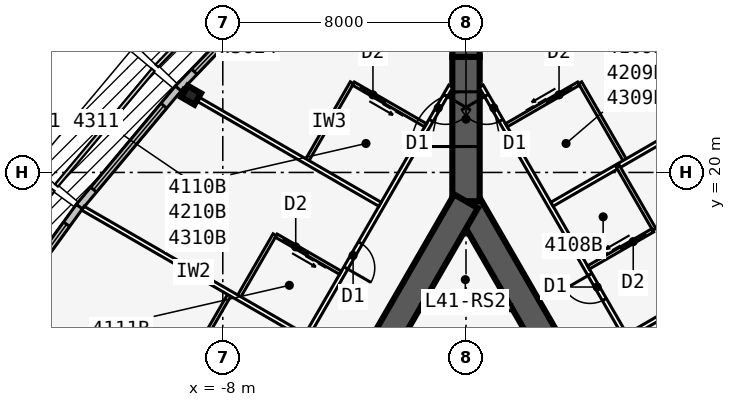
"""IFC4 building model, lengths in metres.
Left out: names, types, materials, properties, quantities, classifications, styles, units other than length and angle.
Written with IfcOpenShell. Run it as: python <this file> out.ifc"""

import sys

from ifc_helpers import new_model, si_unit, direction, frame, frame_2d, origin, origin_2d, place, context, subcontext, project, spatial, rectangle, i_section, extrude, element, fill, save


model = new_model("IFC4")
c1 = context("Model", 3, precision=1e-05, world=origin(), true_north=direction((0.0, 1.0)))
c2 = subcontext(c1, "Body", "Model", "MODEL_VIEW")
j1 = project(units=[si_unit("LENGTHUNIT", "METRE"), si_unit("PLANEANGLEUNIT", "RADIAN")], contexts=[c1])
p1 = place(None, origin())
s1 = spatial("IfcSite", under=j1, at=p1, CompositionType="ELEMENT")
p2 = place(p1, origin())
s2 = spatial("IfcBuilding", under=s1, at=p2, CompositionType="ELEMENT")
p3 = place(p2, frame((0.0, 0.0, 155.5)))
s3 = spatial("IfcBuildingStorey", under=s2, at=p3, CompositionType="ELEMENT", Elevation=155.5)
p4 = place(p3, frame((16.5, -9.526, 0.0), z_axis=(0.0, 0.0, 1.0), x_axis=(-0.499999749417, 0.866025548458, 0.0)))
e1 = element("IfcWall", 1, at=p4, inside=s3, PredefinedType="SHEAR", context=c2, shape_type="SweptSolid", body=[
    extrude(rectangle(XDim=33.0, YDim=0.9, at=frame_2d((16.5, 0.0))), origin(), (0.0, 0.0, 1.0), 3.4),
])
p5 = place(p4, frame((14.15, 0.0, 0.0)))
e2 = element("IfcOpeningElement", 2, at=p5, cuts=e1, PredefinedType="OPENING", context=c2, shape_type="SweptSolid", body=[
    extrude(rectangle(XDim=1.8, YDim=2.13, at=frame_2d((0.9, 1.065))), frame((0.0, 0.46, 0.0), z_axis=(0.0, -1.0, 0.0), x_axis=(1.0, 0.0, 0.0)), (0.0, 0.0, 1.0), 0.92),
])
p6 = place(p4, frame((12.6, 0.0, 0.0)))
e3 = element("IfcOpeningElement", 3, at=p6, cuts=e1, PredefinedType="OPENING", context=c2, shape_type="SweptSolid", body=[
    extrude(rectangle(XDim=1.0, YDim=2.13, at=frame_2d((0.5, 1.065))), frame((0.0, 0.46, 0.0), z_axis=(0.0, -1.0, 0.0), x_axis=(1.0, 0.0, 0.0)), (0.0, 0.0, 1.0), 0.92),
])
p7 = place(p3, frame((0.0, 19.052, 0.0), z_axis=(0.0, 0.0, 1.0), x_axis=(-0.499999749417, -0.866025548458, 0.0)))
e4 = element("IfcWall", 4, at=p7, inside=s3, PredefinedType="SHEAR", context=c2, shape_type="SweptSolid", body=[
    extrude(rectangle(XDim=33.0, YDim=0.9, at=frame_2d((16.5, 0.0))), origin(), (0.0, 0.0, 1.0), 3.4),
])
p8 = place(p7, frame((14.15, 0.0, 0.0)))
e5 = element("IfcOpeningElement", 5, at=p8, cuts=e4, PredefinedType="OPENING", context=c2, shape_type="SweptSolid", body=[
    extrude(rectangle(XDim=1.8, YDim=2.13, at=frame_2d((0.9, 1.065))), frame((0.0, 0.46, 0.0), z_axis=(0.0, -1.0, 0.0), x_axis=(1.0, 0.0, 0.0)), (0.0, 0.0, 1.0), 0.92),
])
p9 = place(p7, frame((12.6, 0.0, 0.0)))
e6 = element("IfcOpeningElement", 6, at=p9, cuts=e4, PredefinedType="OPENING", context=c2, shape_type="SweptSolid", body=[
    extrude(rectangle(XDim=1.0, YDim=2.13, at=frame_2d((0.5, 1.065))), frame((0.0, 0.46, 0.0), z_axis=(0.0, -1.0, 0.0), x_axis=(1.0, 0.0, 0.0)), (0.0, 0.0, 1.0), 0.92),
])
p10 = place(p3, frame((0.0, 19.052, 0.0), z_axis=(0.0, 0.0, 1.0), x_axis=(0.0, 1.0, 0.0)))
e7 = element("IfcWall", 7, at=p10, inside=s3, PredefinedType="SHEAR", context=c2, shape_type="SweptSolid", body=[
    extrude(rectangle(XDim=4.746, YDim=0.9, at=frame_2d((2.373, 0.0))), origin(), (0.0, 0.0, 1.0), 3.4),
])
p11 = place(p10, frame((1.8, 0.0, 0.0)))
e8 = element("IfcOpeningElement", 8, at=p11, cuts=e7, PredefinedType="OPENING", context=c2, shape_type="SweptSolid", body=[
    extrude(rectangle(XDim=1.8, YDim=2.13, at=frame_2d((0.9, 1.065))), frame((0.0, 0.46, 0.0), z_axis=(0.0, -1.0, 0.0), x_axis=(1.0, 0.0, 0.0)), (0.0, 0.0, 1.0), 0.92),
])
p12 = place(p3, frame((0.0, 23.799, 0.0), z_axis=(0.0, 0.0, 1.0), x_axis=(0.0, 1.0, 0.0)))
e9 = element("IfcWall", 9, at=p12, inside=s3, PredefinedType="SHEAR", context=c2, shape_type="SweptSolid", body=[
    extrude(rectangle(XDim=1.155, YDim=0.9, at=frame_2d((0.577, 0.0))), origin(), (0.0, 0.0, 1.0), 3.4),
])
p13 = place(p3, frame((-9.041, 22.541, 0.0), z_axis=(0.0, 0.0, 1.0), x_axis=(-0.5, -0.866025403784, 0.0)))
e10 = element("IfcColumn", 10, at=p13, inside=s3, PredefinedType="COLUMN", context=c2, shape_type="SweptSolid", body=[
    extrude(i_section(OverallWidth=0.432, OverallDepth=0.498, WebThickness=0.056, FlangeThickness=0.089, at=origin_2d()), origin(), (0.0, 0.0, 1.0), 3.4),
])
p14 = place(p3, frame((9.471, 22.754, 0.0), z_axis=(0.0, 0.0, 1.0), x_axis=(-0.691719937936, 0.722165858693, 0.0)))
e11 = element("IfcWall", 11, at=p14, inside=s3, PredefinedType="STANDARD", context=c2, shape_type="SweptSolid", body=[
    extrude(rectangle(XDim=5.148, YDim=0.25, at=frame_2d((2.574, 0.0))), origin(), (0.0, 0.0, 1.0), 3.235),
])
p15 = place(p14, frame((0.774, 0.0, 0.45)))
e12 = element("IfcOpeningElement", 12, at=p15, cuts=e11, PredefinedType="OPENING", context=c2, shape_type="SweptSolid", body=[
    extrude(rectangle(XDim=3.6, YDim=2.4, at=frame_2d((1.8, 1.2))), frame((0.0, 0.135, 0.0), z_axis=(0.0, -1.0, 0.0), x_axis=(1.0, 0.0, 0.0)), (0.0, 0.0, 1.0), 0.27),
])
p16 = place(p3, frame((-5.91, 26.472, 0.0), z_axis=(0.0, 0.0, 1.0), x_axis=(-0.691719937936, -0.722165858693, 0.0)))
e13 = element("IfcWall", 13, at=p16, inside=s3, PredefinedType="STANDARD", context=c2, shape_type="SweptSolid", body=[
    extrude(rectangle(XDim=5.148, YDim=0.25, at=frame_2d((2.574, 0.0))), origin(), (0.0, 0.0, 1.0), 3.235),
])
p17 = place(p16, frame((0.774, 0.0, 0.45)))
e14 = element("IfcOpeningElement", 14, at=p17, cuts=e13, PredefinedType="OPENING", context=c2, shape_type="SweptSolid", body=[
    extrude(rectangle(XDim=3.6, YDim=2.4, at=frame_2d((1.8, 1.2))), frame((0.0, 0.135, 0.0), z_axis=(0.0, -1.0, 0.0), x_axis=(1.0, 0.0, 0.0)), (0.0, 0.0, 1.0), 0.27),
])
p18 = place(p3, frame((-9.465, 22.76, 0.0), z_axis=(0.0, 0.0, 1.0), x_axis=(-0.641810386606, -0.766863369607, 0.0)))
e15 = element("IfcWall", 15, at=p18, inside=s3, PredefinedType="STANDARD", context=c2, shape_type="SweptSolid", body=[
    extrude(rectangle(XDim=5.076, YDim=0.25, at=frame_2d((2.538, 0.0))), origin(), (0.0, 0.0, 1.0), 3.235),
])
p19 = place(p18, frame((0.738, 0.0, 0.45)))
e16 = element("IfcOpeningElement", 16, at=p19, cuts=e15, PredefinedType="OPENING", context=c2, shape_type="SweptSolid", body=[
    extrude(rectangle(XDim=3.6, YDim=2.4, at=frame_2d((1.8, 1.2))), frame((0.0, 0.135, 0.0), z_axis=(0.0, -1.0, 0.0), x_axis=(1.0, 0.0, 0.0)), (0.0, 0.0, 1.0), 0.27),
])
p20 = place(p3, frame((-12.718, 18.875, 0.0), z_axis=(0.0, 0.0, 1.0), x_axis=(-0.587669188412, -0.809101307001, 0.0)))
e17 = element("IfcWall", 17, at=p20, inside=s3, PredefinedType="STANDARD", context=c2, shape_type="SweptSolid", body=[
    extrude(rectangle(XDim=5.028, YDim=0.25, at=frame_2d((2.514, 0.0))), origin(), (0.0, 0.0, 1.0), 3.235),
])
p21 = place(p20, frame((0.714, 0.0, 0.45)))
e18 = element("IfcOpeningElement", 18, at=p21, cuts=e17, PredefinedType="OPENING", context=c2, shape_type="SweptSolid", body=[
    extrude(rectangle(XDim=3.6, YDim=2.4, at=frame_2d((1.8, 1.2))), frame((0.0, 0.135, 0.0), z_axis=(0.0, -1.0, 0.0), x_axis=(1.0, 0.0, 0.0)), (0.0, 0.0, 1.0), 0.27),
])
p22 = place(p3, frame((20.027, -10.985, 0.0), z_axis=(0.0, 0.0, 1.0), x_axis=(-0.500001677587, 0.866024435227, 0.0)))
e19 = element("IfcWall", 19, at=p22, inside=s3, PredefinedType="PARTITIONING", context=c2, shape_type="SweptSolid", body=[
    extrude(rectangle(XDim=39.054, YDim=0.15, at=frame_2d((19.527, 0.0))), origin(), (0.0, 0.0, 1.0), 3.235),
])
p23 = place(p22, frame((1.558, 0.0, 0.0)))
e20 = element("IfcOpeningElement", 20, at=p23, cuts=e19, PredefinedType="OPENING", context=c2, shape_type="SweptSolid", body=[
    extrude(rectangle(XDim=0.95, YDim=2.13, at=frame_2d((0.475, 1.065))), frame((0.0, 0.085, 0.0), z_axis=(0.0, -1.0, 0.0), x_axis=(1.0, 0.0, 0.0)), (0.0, 0.0, 1.0), 0.17),
])
p24 = place(p22, frame((15.352, 0.0, 0.0)))
e21 = element("IfcOpeningElement", 21, at=p24, cuts=e19, PredefinedType="OPENING", context=c2, shape_type="SweptSolid", body=[
    extrude(rectangle(XDim=0.95, YDim=2.13, at=frame_2d((0.475, 1.065))), frame((0.0, 0.085, 0.0), z_axis=(0.0, -1.0, 0.0), x_axis=(1.0, 0.0, 0.0)), (0.0, 0.0, 1.0), 0.17),
])
p25 = place(p22, frame((22.752, 0.0, 0.0)))
e22 = element("IfcOpeningElement", 22, at=p25, cuts=e19, PredefinedType="OPENING", context=c2, shape_type="SweptSolid", body=[
    extrude(rectangle(XDim=0.95, YDim=2.13, at=frame_2d((0.475, 1.065))), frame((0.0, 0.085, 0.0), z_axis=(0.0, -1.0, 0.0), x_axis=(1.0, 0.0, 0.0)), (0.0, 0.0, 1.0), 0.17),
])
p26 = place(p22, frame((30.952, 0.0, 0.0)))
e23 = element("IfcOpeningElement", 23, at=p26, cuts=e19, PredefinedType="OPENING", context=c2, shape_type="SweptSolid", body=[
    extrude(rectangle(XDim=0.95, YDim=2.13, at=frame_2d((0.475, 1.065))), frame((0.0, 0.085, 0.0), z_axis=(0.0, -1.0, 0.0), x_axis=(1.0, 0.0, 0.0)), (0.0, 0.0, 1.0), 0.17),
])
p27 = place(p22, frame((37.752, 0.0, 0.0)))
e24 = element("IfcOpeningElement", 24, at=p27, cuts=e19, PredefinedType="OPENING", context=c2, shape_type="SweptSolid", body=[
    extrude(rectangle(XDim=0.95, YDim=2.13, at=frame_2d((0.475, 1.065))), frame((0.0, 0.085, 0.0), z_axis=(0.0, -1.0, 0.0), x_axis=(1.0, 0.0, 0.0)), (0.0, 0.0, 1.0), 0.17),
])
p28 = place(p3, frame((5.329, 14.623, 0.0), z_axis=(0.0, 0.0, 1.0), x_axis=(0.866011723728, 0.500023693804, 0.0)))
e25 = element("IfcWall", 25, at=p28, inside=s3, PredefinedType="PARTITIONING", context=c2, shape_type="SweptSolid", body=[
    extrude(rectangle(XDim=8.395, YDim=0.15, at=frame_2d((4.198, 0.0))), origin(), (0.0, 0.0, 1.0), 2.389),
])
p29 = place(p3, frame((2.829, 18.954, 0.0), z_axis=(0.0, 0.0, 1.0), x_axis=(0.866015739374, 0.500016738876, 0.0)))
e26 = element("IfcWall", 26, at=p29, inside=s3, PredefinedType="PARTITIONING", context=c2, shape_type="SweptSolid", body=[
    extrude(rectangle(XDim=7.516, YDim=0.15, at=frame_2d((3.758, 0.0))), origin(), (0.0, 0.0, 1.0), 2.389),
])
p30 = place(p3, frame((6.194, 18.125, 0.0), z_axis=(0.0, 0.0, 1.0), x_axis=(-0.500033551112, 0.866006032174, 0.0)))
e27 = element("IfcWall", 27, at=p30, inside=s3, PredefinedType="PLUMBINGWALL", context=c2, shape_type="SweptSolid", body=[
    extrude(rectangle(XDim=2.4, YDim=0.12, at=frame_2d((1.2, 0.0))), origin(), (0.0, 0.0, 1.0), 3.235),
])
p31 = place(p3, frame((4.029, 16.875, 0.0), z_axis=(0.0, 0.0, 1.0), x_axis=(0.865980627057, 0.500077547548, 0.0)))
e28 = element("IfcWall", 28, at=p31, inside=s3, PredefinedType="PLUMBINGWALL", context=c2, shape_type="SweptSolid", body=[
    extrude(rectangle(XDim=2.44, YDim=0.12, at=frame_2d((1.22, 0.0))), origin(), (0.0, 0.0, 1.0), 3.235),
])
p32 = place(p31, frame((1.25, 0.0, 0.0)))
e29 = element("IfcOpeningElement", 29, at=p32, cuts=e28, PredefinedType="OPENING", context=c2, shape_type="SweptSolid", body=[
    extrude(rectangle(XDim=0.9, YDim=2.13, at=frame_2d((0.45, 1.065))), frame((0.0, 0.07, 0.0), z_axis=(0.0, -1.0, 0.0), x_axis=(1.0, 0.0, 0.0)), (0.0, 0.0, 1.0), 0.14),
])
p33 = place(p3, frame((5.253, 20.354, 0.0), z_axis=(0.0, 0.0, 1.0), x_axis=(-0.499990139034, 0.866031096941, 0.0)))
e30 = element("IfcWall", 30, at=p33, inside=s3, PredefinedType="PLUMBINGWALL", context=c2, shape_type="SweptSolid", body=[
    extrude(rectangle(XDim=3.0, YDim=0.12, at=frame_2d((1.5, 0.0))), origin(), (0.0, 0.0, 1.0), 3.235),
])
p34 = place(p3, frame((1.329, 21.552, 0.0), z_axis=(0.0, 0.0, 1.0), x_axis=(0.865997131366, 0.500048966069, 0.0)))
e31 = element("IfcWall", 31, at=p34, inside=s3, PredefinedType="PLUMBINGWALL", context=c2, shape_type="SweptSolid", body=[
    extrude(rectangle(XDim=2.74, YDim=0.12, at=frame_2d((1.37, 0.0))), origin(), (0.0, 0.0, 1.0), 3.235),
])
p35 = place(p34, frame((1.55, 0.0, 0.0)))
e32 = element("IfcOpeningElement", 32, at=p35, cuts=e31, PredefinedType="OPENING", context=c2, shape_type="SweptSolid", body=[
    extrude(rectangle(XDim=0.9, YDim=2.13, at=frame_2d((0.45, 1.065))), frame((0.0, 0.07, 0.0), z_axis=(0.0, -1.0, 0.0), x_axis=(1.0, 0.0, 0.0)), (0.0, 0.0, 1.0), 0.14),
])
p36 = place(p3, frame((-0.5, 22.836, 0.0), z_axis=(0.0, 0.0, 1.0), x_axis=(-0.500001677587, -0.866024435227, 0.0)))
e33 = element("IfcWall", 33, at=p36, inside=s3, PredefinedType="PARTITIONING", context=c2, shape_type="SweptSolid", body=[
    extrude(rectangle(XDim=39.054, YDim=0.15, at=frame_2d((19.527, 0.0))), origin(), (0.0, 0.0, 1.0), 3.235),
])
p37 = place(p36, frame((0.352, 0.0, 0.0)))
e34 = element("IfcOpeningElement", 34, at=p37, cuts=e33, PredefinedType="OPENING", context=c2, shape_type="SweptSolid", body=[
    extrude(rectangle(XDim=0.95, YDim=2.13, at=frame_2d((0.475, 1.065))), frame((0.0, 0.085, 0.0), z_axis=(0.0, -1.0, 0.0), x_axis=(1.0, 0.0, 0.0)), (0.0, 0.0, 1.0), 0.17),
])
p38 = place(p36, frame((5.952, 0.0, 0.0)))
e35 = element("IfcOpeningElement", 35, at=p38, cuts=e33, PredefinedType="OPENING", context=c2, shape_type="SweptSolid", body=[
    extrude(rectangle(XDim=0.95, YDim=2.13, at=frame_2d((0.475, 1.065))), frame((0.0, 0.085, 0.0), z_axis=(0.0, -1.0, 0.0), x_axis=(1.0, 0.0, 0.0)), (0.0, 0.0, 1.0), 0.17),
])
p39 = place(p36, frame((12.752, 0.0, 0.0)))
e36 = element("IfcOpeningElement", 36, at=p39, cuts=e33, PredefinedType="OPENING", context=c2, shape_type="SweptSolid", body=[
    extrude(rectangle(XDim=0.95, YDim=2.13, at=frame_2d((0.475, 1.065))), frame((0.0, 0.085, 0.0), z_axis=(0.0, -1.0, 0.0), x_axis=(1.0, 0.0, 0.0)), (0.0, 0.0, 1.0), 0.17),
])
p40 = place(p36, frame((25.352, 0.0, 0.0)))
e37 = element("IfcOpeningElement", 37, at=p40, cuts=e33, PredefinedType="OPENING", context=c2, shape_type="SweptSolid", body=[
    extrude(rectangle(XDim=0.95, YDim=2.13, at=frame_2d((0.475, 1.065))), frame((0.0, 0.085, 0.0), z_axis=(0.0, -1.0, 0.0), x_axis=(1.0, 0.0, 0.0)), (0.0, 0.0, 1.0), 0.17),
])
p41 = place(p36, frame((32.152, 0.0, 0.0)))
e38 = element("IfcOpeningElement", 38, at=p41, cuts=e33, PredefinedType="OPENING", context=c2, shape_type="SweptSolid", body=[
    extrude(rectangle(XDim=0.95, YDim=2.13, at=frame_2d((0.475, 1.065))), frame((0.0, 0.085, 0.0), z_axis=(0.0, -1.0, 0.0), x_axis=(1.0, 0.0, 0.0)), (0.0, 0.0, 1.0), 0.17),
])
p42 = place(p36, frame((37.752, 0.0, 0.0)))
e39 = element("IfcOpeningElement", 39, at=p42, cuts=e33, PredefinedType="OPENING", context=c2, shape_type="SweptSolid", body=[
    extrude(rectangle(XDim=0.95, YDim=2.13, at=frame_2d((0.475, 1.065))), frame((0.0, 0.085, 0.0), z_axis=(0.0, -1.0, 0.0), x_axis=(1.0, 0.0, 0.0)), (0.0, 0.0, 1.0), 0.17),
])
p43 = place(p3, frame((-2.829, 18.954, 0.0), z_axis=(0.0, 0.0, 1.0), x_axis=(-0.866015739374, 0.500016738876, 0.0)))
e40 = element("IfcWall", 40, at=p43, inside=s3, PredefinedType="PARTITIONING", context=c2, shape_type="SweptSolid", body=[
    extrude(rectangle(XDim=7.516, YDim=0.15, at=frame_2d((3.758, 0.0))), origin(), (0.0, 0.0, 1.0), 2.389),
])
p44 = place(p3, frame((-5.329, 14.623, 0.0), z_axis=(0.0, 0.0, 1.0), x_axis=(-0.866011723728, 0.500023693804, 0.0)))
e41 = element("IfcWall", 41, at=p44, inside=s3, PredefinedType="PARTITIONING", context=c2, shape_type="SweptSolid", body=[
    extrude(rectangle(XDim=8.395, YDim=0.15, at=frame_2d((4.198, 0.0))), origin(), (0.0, 0.0, 1.0), 2.389),
])
p45 = place(p3, frame((-3.753, 22.952, 0.0), z_axis=(0.0, 0.0, 1.0), x_axis=(-0.499990139034, -0.866031096941, 0.0)))
e42 = element("IfcWall", 42, at=p45, inside=s3, PredefinedType="PLUMBINGWALL", context=c2, shape_type="SweptSolid", body=[
    extrude(rectangle(XDim=3.0, YDim=0.12, at=frame_2d((1.5, 0.0))), origin(), (0.0, 0.0, 1.0), 3.235),
])
p46 = place(p3, frame((-1.329, 21.552, 0.0), z_axis=(0.0, 0.0, 1.0), x_axis=(-0.865997131366, 0.500048966069, 0.0)))
e43 = element("IfcWall", 43, at=p46, inside=s3, PredefinedType="PLUMBINGWALL", context=c2, shape_type="SweptSolid", body=[
    extrude(rectangle(XDim=2.74, YDim=0.12, at=frame_2d((1.37, 0.0))), origin(), (0.0, 0.0, 1.0), 3.235),
])
p47 = place(p46, frame((1.55, 0.0, 0.0)))
e44 = element("IfcOpeningElement", 44, at=p47, cuts=e43, PredefinedType="OPENING", context=c2, shape_type="SweptSolid", body=[
    extrude(rectangle(XDim=0.9, YDim=2.13, at=frame_2d((0.45, 1.065))), frame((0.0, 0.07, 0.0), z_axis=(0.0, -1.0, 0.0), x_axis=(1.0, 0.0, 0.0)), (0.0, 0.0, 1.0), 0.14),
])
p48 = place(p3, frame((-6.293, 17.952, 0.0), z_axis=(0.0, 0.0, 1.0), x_axis=(-0.499957262057, -0.866050077142, 0.0)))
e45 = element("IfcWall", 45, at=p48, inside=s3, PredefinedType="PLUMBINGWALL", context=c2, shape_type="SweptSolid", body=[
    extrude(rectangle(XDim=2.4, YDim=0.12, at=frame_2d((1.2, 0.0))), origin(), (0.0, 0.0, 1.0), 3.235),
])
p49 = place(p3, frame((-4.128, 16.702, 0.0), z_axis=(0.0, 0.0, 1.0), x_axis=(-0.866048967903, 0.499959183527, 0.0)))
e46 = element("IfcWall", 46, at=p49, inside=s3, PredefinedType="PLUMBINGWALL", context=c2, shape_type="SweptSolid", body=[
    extrude(rectangle(XDim=2.44, YDim=0.12, at=frame_2d((1.22, 0.0))), origin(), (0.0, 0.0, 1.0), 3.235),
])
p50 = place(p49, frame((1.25, 0.0, 0.0)))
e47 = element("IfcOpeningElement", 47, at=p50, cuts=e46, PredefinedType="OPENING", context=c2, shape_type="SweptSolid", body=[
    extrude(rectangle(XDim=0.9, YDim=2.13, at=frame_2d((0.45, 1.065))), frame((0.0, 0.07, 0.0), z_axis=(0.0, -1.0, 0.0), x_axis=(1.0, 0.0, 0.0)), (0.0, 0.0, 1.0), 0.14),
])
p51 = place(p3, frame((-7.753, 16.023, 0.0), z_axis=(0.0, 0.0, 1.0), x_axis=(-0.499990139034, -0.866031096941, 0.0)))
e48 = element("IfcWall", 48, at=p51, inside=s3, PredefinedType="PLUMBINGWALL", context=c2, shape_type="SweptSolid", body=[
    extrude(rectangle(XDim=3.0, YDim=0.12, at=frame_2d((1.5, 0.0))), origin(), (0.0, 0.0, 1.0), 3.235),
])
p52 = place(p3, frame((-1.501, 15.552, 0.0), z_axis=(0.0, 0.0, 1.0), x_axis=(1.0, 0.0, 0.0)))
e49 = element("IfcWall", 49, at=p52, inside=s3, PredefinedType="SOLIDWALL", context=c2, shape_type="SweptSolid", body=[
    extrude(rectangle(XDim=3.002, YDim=0.2, at=frame_2d((1.501, 0.0))), origin(), (0.0, 0.0, 1.0), 3.235),
])
p53 = place(p17, origin())
e50 = element("IfcWindow", 50, at=p53, inside=s3, PartitioningType="SINGLE_PANEL", PredefinedType="WINDOW", context=c2, shape_type="SweptSolid", body=[
    extrude(rectangle(XDim=3.6, YDim=2.4, at=frame_2d((1.8, 1.2))), frame((0.0, 0.03, 0.0), z_axis=(0.0, -1.0, 0.0), x_axis=(1.0, 0.0, 0.0)), (0.0, 0.0, 1.0), 0.06),
])
fill(e14, e50)
p54 = place(p19, origin())
e51 = element("IfcWindow", 51, at=p54, inside=s3, PartitioningType="SINGLE_PANEL", PredefinedType="WINDOW", context=c2, shape_type="SweptSolid", body=[
    extrude(rectangle(XDim=3.6, YDim=2.4, at=frame_2d((1.8, 1.2))), frame((0.0, 0.03, 0.0), z_axis=(0.0, -1.0, 0.0), x_axis=(1.0, 0.0, 0.0)), (0.0, 0.0, 1.0), 0.06),
])
fill(e16, e51)
p55 = place(p21, origin())
e52 = element("IfcWindow", 52, at=p55, inside=s3, PartitioningType="SINGLE_PANEL", PredefinedType="WINDOW", context=c2, shape_type="SweptSolid", body=[
    extrude(rectangle(XDim=3.6, YDim=2.4, at=frame_2d((1.8, 1.2))), frame((0.0, 0.03, 0.0), z_axis=(0.0, -1.0, 0.0), x_axis=(1.0, 0.0, 0.0)), (0.0, 0.0, 1.0), 0.06),
])
fill(e18, e52)
p56 = place(p32, origin())
e53 = element("IfcDoor", 53, at=p56, inside=s3, OperationType="SLIDING_TO_LEFT", PredefinedType="DOOR", context=c2, shape_type="SweptSolid", body=[
    extrude(rectangle(XDim=0.9, YDim=2.13, at=frame_2d((0.45, 1.065))), frame((0.0, 0.025, 0.0), z_axis=(0.0, -1.0, 0.0), x_axis=(1.0, 0.0, 0.0)), (0.0, 0.0, 1.0), 0.05),
])
fill(e29, e53)
p57 = place(p26, origin())
e54 = element("IfcDoor", 54, at=p57, inside=s3, OperationType="SINGLE_SWING_RIGHT", PredefinedType="DOOR", context=c2, shape_type="SweptSolid", body=[
    extrude(rectangle(XDim=0.95, YDim=2.13, at=frame_2d((0.475, 1.065))), frame((0.0, 0.025, 0.0), z_axis=(0.0, -1.0, 0.0), x_axis=(1.0, 0.0, 0.0)), (0.0, 0.0, 1.0), 0.05),
])
fill(e23, e54)
p58 = place(p35, origin())
e55 = element("IfcDoor", 55, at=p58, inside=s3, OperationType="SLIDING_TO_LEFT", PredefinedType="DOOR", context=c2, shape_type="SweptSolid", body=[
    extrude(rectangle(XDim=0.9, YDim=2.13, at=frame_2d((0.45, 1.065))), frame((0.0, 0.025, 0.0), z_axis=(0.0, -1.0, 0.0), x_axis=(1.0, 0.0, 0.0)), (0.0, 0.0, 1.0), 0.05),
])
fill(e32, e55)
p59 = place(p27, origin())
e56 = element("IfcDoor", 56, at=p59, inside=s3, OperationType="SINGLE_SWING_RIGHT", PredefinedType="DOOR", context=c2, shape_type="SweptSolid", body=[
    extrude(rectangle(XDim=0.95, YDim=2.13, at=frame_2d((0.475, 1.065))), frame((0.0, 0.025, 0.0), z_axis=(0.0, -1.0, 0.0), x_axis=(1.0, 0.0, 0.0)), (0.0, 0.0, 1.0), 0.05),
])
fill(e24, e56)
p60 = place(p47, origin())
e57 = element("IfcDoor", 57, at=p60, inside=s3, OperationType="SLIDING_TO_LEFT", PredefinedType="DOOR", context=c2, shape_type="SweptSolid", body=[
    extrude(rectangle(XDim=0.9, YDim=2.13, at=frame_2d((0.45, 1.065))), frame((0.0, 0.025, 0.0), z_axis=(0.0, -1.0, 0.0), x_axis=(1.0, 0.0, 0.0)), (0.0, 0.0, 1.0), 0.05),
])
fill(e44, e57)
p61 = place(p37, origin())
e58 = element("IfcDoor", 58, at=p61, inside=s3, OperationType="SINGLE_SWING_LEFT", PredefinedType="DOOR", context=c2, shape_type="SweptSolid", body=[
    extrude(rectangle(XDim=0.95, YDim=2.13, at=frame_2d((0.475, 1.065))), frame((0.0, 0.025, 0.0), z_axis=(0.0, -1.0, 0.0), x_axis=(1.0, 0.0, 0.0)), (0.0, 0.0, 1.0), 0.05),
])
fill(e34, e58)
p62 = place(p50, origin())
e59 = element("IfcDoor", 59, at=p62, inside=s3, OperationType="SLIDING_TO_LEFT", PredefinedType="DOOR", context=c2, shape_type="SweptSolid", body=[
    extrude(rectangle(XDim=0.9, YDim=2.13, at=frame_2d((0.45, 1.065))), frame((0.0, 0.025, 0.0), z_axis=(0.0, -1.0, 0.0), x_axis=(1.0, 0.0, 0.0)), (0.0, 0.0, 1.0), 0.05),
])
fill(e47, e59)
p63 = place(p38, origin())
e60 = element("IfcDoor", 60, at=p63, inside=s3, OperationType="SINGLE_SWING_RIGHT", PredefinedType="DOOR", context=c2, shape_type="SweptSolid", body=[
    extrude(rectangle(XDim=0.95, YDim=2.13, at=frame_2d((0.475, 1.065))), frame((0.0, 0.025, 0.0), z_axis=(0.0, -1.0, 0.0), x_axis=(1.0, 0.0, 0.0)), (0.0, 0.0, 1.0), 0.05),
])
fill(e35, e60)
p64 = place(p11, origin())
e61 = element("IfcDoor", 61, at=p64, inside=s3, OperationType="DOUBLE_DOOR_DOUBLE_SWING", PredefinedType="DOOR", context=c2, shape_type="SweptSolid", body=[
    extrude(rectangle(XDim=1.8, YDim=2.13, at=frame_2d((0.9, 1.065))), frame((0.0, 0.025, 0.0), z_axis=(0.0, -1.0, 0.0), x_axis=(1.0, 0.0, 0.0)), (0.0, 0.0, 1.0), 0.05),
])
fill(e8, e61)
save(model, sys.argv[1])
